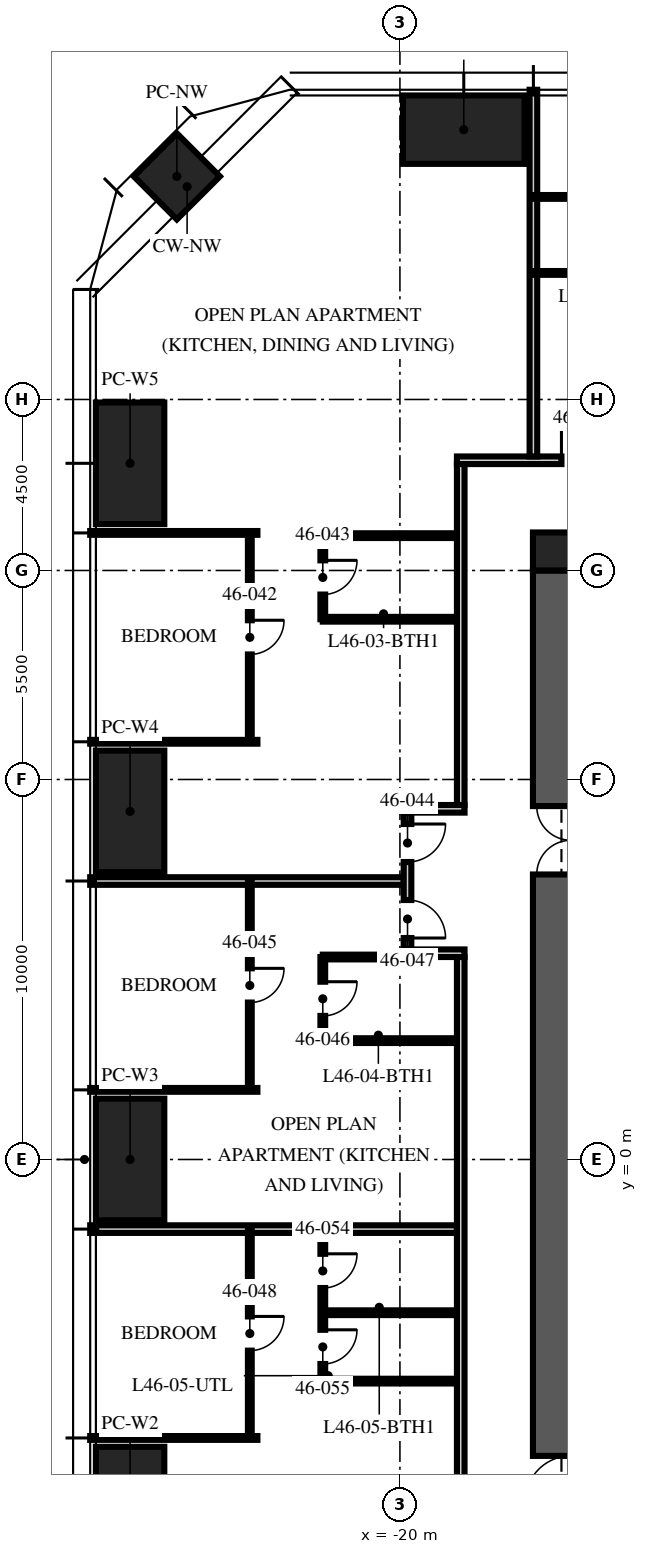
"""IFC4 building model, lengths in metres.
Left out: names, types, materials, properties, quantities, classifications, styles, units other than length and angle.
Written with IfcOpenShell. Run it as: python <this file> out.ifc"""

import sys

from ifc_helpers import new_model, si_unit, direction, frame, frame_2d, origin, origin_2d, place, context, subcontext, project, spatial, rectangle, hollow_rectangle, extrude, element, fill, save


model = new_model("IFC4")
c1 = context("Model", 3, precision=1e-05, world=origin(), true_north=direction((0.0, 1.0)))
c2 = subcontext(c1, "Body", "Model", "MODEL_VIEW")
j1 = project(units=[si_unit("LENGTHUNIT", "METRE"), si_unit("PLANEANGLEUNIT", "RADIAN")], contexts=[c1])
p1 = place(None, origin())
s1 = spatial("IfcSite", under=j1, at=p1, CompositionType="ELEMENT")
p2 = place(p1, origin())
s2 = spatial("IfcBuilding", under=s1, at=p2, CompositionType="ELEMENT")
p3 = place(p2, frame((0.0, 0.0, 182.25)))
s3 = spatial("IfcBuildingStorey", under=s2, at=p3, CompositionType="ELEMENT", Elevation=182.25)
p4 = place(p3, frame((-15.5, -15.5, -0.25), z_axis=(0.0, 0.0, 1.0), x_axis=(0.0, 1.0, 0.0)))
e1 = element("IfcWall", 1, at=p4, inside=s3, PredefinedType="SHEAR", context=c2, shape_type="SweptSolid", body=[
    extrude(rectangle(XDim=31.0, YDim=2.0, at=frame_2d((15.5, 0.0))), origin(), (0.0, 0.0, 1.0), 3.7),
])
p5 = place(p4, frame((6.5, 0.0, 0.25)))
e2 = element("IfcOpeningElement", 2, at=p5, cuts=e1, PredefinedType="OPENING", context=c2, shape_type="SweptSolid", body=[
    extrude(rectangle(XDim=1.2, YDim=2.1, at=frame_2d((0.6, 1.05))), frame((0.0, 1.01, 0.0), z_axis=(0.0, -1.0, 0.0), x_axis=(1.0, 0.0, 0.0)), (0.0, 0.0, 1.0), 2.02),
])
p6 = place(p4, frame((23.0, 0.0, 0.25)))
e3 = element("IfcOpeningElement", 3, at=p6, cuts=e1, PredefinedType="OPENING", context=c2, shape_type="SweptSolid", body=[
    extrude(rectangle(XDim=1.8, YDim=2.1, at=frame_2d((0.9, 1.05))), frame((0.0, 1.01, 0.0), z_axis=(0.0, -1.0, 0.0), x_axis=(1.0, 0.0, 0.0)), (0.0, 0.0, 1.0), 2.02),
])
p7 = place(p3, frame((-16.0, 16.0, -0.25), z_axis=(0.0, 0.0, 1.0), x_axis=(1.0, 0.0, 0.0)))
e4 = element("IfcColumn", 4, at=p7, inside=s3, PredefinedType="COLUMN", context=c2, shape_type="SweptSolid", body=[
    extrude(rectangle(XDim=1.0, YDim=1.0, at=origin_2d()), origin(), (0.0, 0.0, 1.0), 3.7),
])
for number, where, z_axis, x_axis in (
    (5, (-18.32, 27.1, 0.0), (0.0, 0.0, 1.0), (1.0, 0.0, 0.0)),
    (6, (-27.1, -9.16, 0.0), (0.0, 0.0, 1.0), (0.0, 1.0, 0.0)),
    (7, (-27.1, 0.0, 0.0), (0.0, 0.0, 1.0), (0.0, 1.0, 0.0)),
    (8, (-27.1, 9.16, 0.0), (0.0, 0.0, 1.0), (0.0, 1.0, 0.0)),
    (9, (-27.1, 18.32, 0.0), (0.0, 0.0, 1.0), (0.0, 1.0, 0.0)),
):
    element("IfcColumn", number, at=place(p3, frame(where, z_axis=z_axis, x_axis=x_axis)), inside=s3, PredefinedType="COLUMN", context=c2, shape_type="SweptSolid", body=[
        extrude(hollow_rectangle(XDim=3.2, YDim=1.8, WallThickness=0.2, at=origin_2d()), origin(), (0.0, 0.0, 1.0), 3.75),
    ])
p8 = place(p3, frame((-25.87, 25.87, 0.0), z_axis=(0.0, 0.0, 1.0), x_axis=(0.707106781187, 0.707106781187, 0.0)))
e10 = element("IfcColumn", 10, at=p8, inside=s3, PredefinedType="COLUMN", context=c2, shape_type="SweptSolid", body=[
    extrude(hollow_rectangle(XDim=1.6, YDim=1.6, WallThickness=0.1, at=origin_2d()), origin(), (0.0, 0.0, 1.0), 3.75),
])
p9 = place(p3, frame((-18.5, 18.4, 0.0), z_axis=(0.0, 0.0, 1.0), x_axis=(1.0, 0.0, 0.0)))
e11 = element("IfcWall", 11, at=p9, inside=s3, PredefinedType="PARTITIONING", context=c2, shape_type="SweptSolid", body=[
    extrude(rectangle(XDim=10.1, YDim=0.2, at=frame_2d((5.05, 0.0))), origin(), (0.0, 0.0, 1.0), 2.25),
])
p10 = place(p9, frame((2.75, 0.0, 0.0)))
e12 = element("IfcOpeningElement", 12, at=p10, cuts=e11, PredefinedType="OPENING", context=c2, shape_type="SweptSolid", body=[
    extrude(rectangle(XDim=1.0, YDim=2.2, at=frame_2d((0.5, 1.1))), frame((0.0, 0.11, 0.0), z_axis=(0.0, -1.0, 0.0), x_axis=(1.0, 0.0, 0.0)), (0.0, 0.0, 1.0), 0.22),
])
p11 = place(p3, frame((-16.488, 18.5, 0.0), z_axis=(0.0, 0.0, 1.0), x_axis=(0.0, 1.0, 0.0)))
e13 = element("IfcWall", 13, at=p11, inside=s3, PredefinedType="PARTITIONING", context=c2, shape_type="SweptSolid", body=[
    extrude(rectangle(XDim=9.65, YDim=0.2, at=frame_2d((4.825, 0.0))), origin(), (0.0, 0.0, 1.0), 2.56),
])
for number, where, z_axis, x_axis in (
    (14, (-23.75, 16.488, 0.0), (0.0, 0.0, 1.0), (-1.0, 0.0, 0.0)),
    (15, (-23.75, 10.992, 0.0), (0.0, 0.0, 1.0), (-1.0, 0.0, 0.0)),
):
    element("IfcWall", number, at=place(p3, frame(where, z_axis=z_axis, x_axis=x_axis)), inside=s3, PredefinedType="PARTITIONING", context=c2, shape_type="SweptSolid", body=[
        extrude(rectangle(XDim=4.4, YDim=0.1, at=frame_2d((2.2, 0.0))), origin(), (0.0, 0.0, 1.0), 2.56),
    ])
p12 = place(p3, frame((-19.9, 7.328, 0.0), z_axis=(0.0, 0.0, 1.0), x_axis=(-1.0, 0.0, 0.0)))
e16 = element("IfcWall", 16, at=p12, inside=s3, PredefinedType="PARTITIONING", context=c2, shape_type="SweptSolid", body=[
    extrude(rectangle(XDim=8.25, YDim=0.2, at=frame_2d((4.125, 0.0))), origin(), (0.0, 0.0, 1.0), 2.56),
])
p13 = place(p3, frame((-23.75, 1.832, 0.0), z_axis=(0.0, 0.0, 1.0), x_axis=(-1.0, 0.0, 0.0)))
e17 = element("IfcWall", 17, at=p13, inside=s3, PredefinedType="PARTITIONING", context=c2, shape_type="SweptSolid", body=[
    extrude(rectangle(XDim=4.4, YDim=0.1, at=frame_2d((2.2, 0.0))), origin(), (0.0, 0.0, 1.0), 2.56),
])
p14 = place(p3, frame((-18.5, -1.832, 0.0), z_axis=(0.0, 0.0, 1.0), x_axis=(-1.0, 0.0, 0.0)))
e18 = element("IfcWall", 18, at=p14, inside=s3, PredefinedType="PARTITIONING", context=c2, shape_type="SweptSolid", body=[
    extrude(rectangle(XDim=9.65, YDim=0.2, at=frame_2d((4.825, 0.0))), origin(), (0.0, 0.0, 1.0), 2.56),
])
p15 = place(p3, frame((-23.75, -7.328, 0.0), z_axis=(0.0, 0.0, 1.0), x_axis=(-1.0, 0.0, 0.0)))
e19 = element("IfcWall", 19, at=p15, inside=s3, PredefinedType="PARTITIONING", context=c2, shape_type="SweptSolid", body=[
    extrude(rectangle(XDim=4.4, YDim=0.1, at=frame_2d((2.2, 0.0))), origin(), (0.0, 0.0, 1.0), 2.56),
])
p16 = place(p3, frame((-10.992, 25.33, 0.0), z_axis=(0.0, 0.0, 1.0), x_axis=(-1.0, 0.0, 0.0)))
e20 = element("IfcWall", 20, at=p16, inside=s3, PredefinedType="PARTITIONING", context=c2, shape_type="SweptSolid", body=[
    extrude(rectangle(XDim=5.496, YDim=0.1, at=frame_2d((2.748, 0.0))), origin(), (0.0, 0.0, 1.0), 2.56),
])
p17 = place(p16, frame((0.15, 0.0, 0.0)))
e21 = element("IfcOpeningElement", 21, at=p17, cuts=e20, PredefinedType="OPENING", context=c2, shape_type="SweptSolid", body=[
    extrude(rectangle(XDim=0.9, YDim=2.1, at=frame_2d((0.45, 1.05))), frame((0.0, 0.06, 0.0), z_axis=(0.0, -1.0, 0.0), x_axis=(1.0, 0.0, 0.0)), (0.0, 0.0, 1.0), 0.12),
])
p18 = place(p16, frame((2.898, 0.0, 0.0)))
e22 = element("IfcOpeningElement", 22, at=p18, cuts=e20, PredefinedType="OPENING", context=c2, shape_type="SweptSolid", body=[
    extrude(rectangle(XDim=0.9, YDim=2.1, at=frame_2d((0.45, 1.05))), frame((0.0, 0.06, 0.0), z_axis=(0.0, -1.0, 0.0), x_axis=(1.0, 0.0, 0.0)), (0.0, 0.0, 1.0), 0.12),
])
p19 = place(p3, frame((-12.192, 23.33, 0.0), z_axis=(0.0, 0.0, 1.0), x_axis=(-1.0, 0.0, 0.0)))
e23 = element("IfcWall", 23, at=p19, inside=s3, PredefinedType="PARTITIONING", context=c2, shape_type="SweptSolid", body=[
    extrude(rectangle(XDim=4.296, YDim=0.1, at=frame_2d((2.148, 0.0))), origin(), (0.0, 0.0, 1.0), 2.56),
])
p20 = place(p3, frame((-23.95, 16.488, 0.0), z_axis=(0.0, 0.0, 1.0), x_axis=(0.0, -1.0, 0.0)))
e24 = element("IfcWall", 24, at=p20, inside=s3, PredefinedType="PARTITIONING", context=c2, shape_type="SweptSolid", body=[
    extrude(rectangle(XDim=5.496, YDim=0.1, at=frame_2d((2.748, 0.0))), origin(), (0.0, 0.0, 1.0), 2.56),
])
p21 = place(p20, frame((2.298, 0.0, 0.0)))
e25 = element("IfcOpeningElement", 25, at=p21, cuts=e24, PredefinedType="OPENING", context=c2, shape_type="SweptSolid", body=[
    extrude(rectangle(XDim=0.9, YDim=2.1, at=frame_2d((0.45, 1.05))), frame((0.0, 0.06, 0.0), z_axis=(0.0, -1.0, 0.0), x_axis=(1.0, 0.0, 0.0)), (0.0, 0.0, 1.0), 0.12),
])
p22 = place(p3, frame((-22.03, 16.417, 0.0), z_axis=(0.0, 0.0, 1.0), x_axis=(0.0, -1.0, 0.0)))
e26 = element("IfcWall", 26, at=p22, inside=s3, PredefinedType="PARTITIONING", context=c2, shape_type="SweptSolid", body=[
    extrude(rectangle(XDim=2.2, YDim=0.125, at=frame_2d((1.1, 0.0))), origin(), (0.0, 0.0, 1.0), 3.45),
])
p23 = place(p22, frame((0.65, 0.0, 0.0)))
e27 = element("IfcOpeningElement", 27, at=p23, cuts=e26, PredefinedType="OPENING", context=c2, shape_type="SweptSolid", body=[
    extrude(rectangle(XDim=0.9, YDim=2.1, at=frame_2d((0.45, 1.05))), frame((0.0, 0.073, 0.0), z_axis=(0.0, -1.0, 0.0), x_axis=(1.0, 0.0, 0.0)), (0.0, 0.0, 1.0), 0.145),
])
for number, where, z_axis, x_axis in (
    (28, (-18.5, 16.417, 0.0), (0.0, 0.0, 1.0), (-1.0, 0.0, 0.0)),
    (29, (-18.5, 14.217, 0.0), (0.0, 0.0, 1.0), (-1.0, 0.0, 0.0)),
):
    element("IfcWall", number, at=place(p3, frame(where, z_axis=z_axis, x_axis=x_axis)), inside=s3, PredefinedType="PARTITIONING", context=c2, shape_type="SweptSolid", body=[
        extrude(rectangle(XDim=3.53, YDim=0.125, at=frame_2d((1.765, 0.0))), origin(), (0.0, 0.0, 1.0), 3.45),
    ])
p24 = place(p3, frame((-23.95, 7.328, 0.0), z_axis=(0.0, 0.0, 1.0), x_axis=(0.0, -1.0, 0.0)))
e30 = element("IfcWall", 30, at=p24, inside=s3, PredefinedType="PARTITIONING", context=c2, shape_type="SweptSolid", body=[
    extrude(rectangle(XDim=5.496, YDim=0.1, at=frame_2d((2.748, 0.0))), origin(), (0.0, 0.0, 1.0), 2.56),
])
p25 = place(p24, frame((2.298, 0.0, 0.0)))
e31 = element("IfcOpeningElement", 31, at=p25, cuts=e30, PredefinedType="OPENING", context=c2, shape_type="SweptSolid", body=[
    extrude(rectangle(XDim=0.9, YDim=2.1, at=frame_2d((0.45, 1.05))), frame((0.0, 0.06, 0.0), z_axis=(0.0, -1.0, 0.0), x_axis=(1.0, 0.0, 0.0)), (0.0, 0.0, 1.0), 0.12),
])
p26 = place(p3, frame((-22.03, 5.328, 0.0), z_axis=(0.0, 0.0, 1.0), x_axis=(0.0, -1.0, 0.0)))
e32 = element("IfcWall", 32, at=p26, inside=s3, PredefinedType="PARTITIONING", context=c2, shape_type="SweptSolid", body=[
    extrude(rectangle(XDim=2.2, YDim=0.125, at=frame_2d((1.1, 0.0))), origin(), (0.0, 0.0, 1.0), 2.56),
])
p27 = place(p26, frame((0.65, 0.0, 0.0)))
e33 = element("IfcOpeningElement", 33, at=p27, cuts=e32, PredefinedType="OPENING", context=c2, shape_type="SweptSolid", body=[
    extrude(rectangle(XDim=0.9, YDim=2.1, at=frame_2d((0.45, 1.05))), frame((0.0, 0.073, 0.0), z_axis=(0.0, -1.0, 0.0), x_axis=(1.0, 0.0, 0.0)), (0.0, 0.0, 1.0), 0.145),
])
p28 = place(p3, frame((-19.97, 5.328, 0.0), z_axis=(0.0, 0.0, 1.0), x_axis=(-1.0, 0.0, 0.0)))
e34 = element("IfcWall", 34, at=p28, inside=s3, PredefinedType="PARTITIONING", context=c2, shape_type="SweptSolid", body=[
    extrude(rectangle(XDim=2.06, YDim=0.125, at=frame_2d((1.03, 0.0))), origin(), (0.0, 0.0, 1.0), 3.45),
])
p29 = place(p3, frame((-18.5, 3.128, 0.0), z_axis=(0.0, 0.0, 1.0), x_axis=(-1.0, 0.0, 0.0)))
e35 = element("IfcWall", 35, at=p29, inside=s3, PredefinedType="PARTITIONING", context=c2, shape_type="SweptSolid", body=[
    extrude(rectangle(XDim=3.53, YDim=0.125, at=frame_2d((1.765, 0.0))), origin(), (0.0, 0.0, 1.0), 3.45),
])
p30 = place(p3, frame((-23.95, -1.832, 0.0), z_axis=(0.0, 0.0, 1.0), x_axis=(0.0, -1.0, 0.0)))
e36 = element("IfcWall", 36, at=p30, inside=s3, PredefinedType="PARTITIONING", context=c2, shape_type="SweptSolid", body=[
    extrude(rectangle(XDim=5.496, YDim=0.1, at=frame_2d((2.748, 0.0))), origin(), (0.0, 0.0, 1.0), 2.56),
])
p31 = place(p30, frame((2.298, 0.0, 0.0)))
e37 = element("IfcOpeningElement", 37, at=p31, cuts=e36, PredefinedType="OPENING", context=c2, shape_type="SweptSolid", body=[
    extrude(rectangle(XDim=0.9, YDim=2.1, at=frame_2d((0.45, 1.05))), frame((0.0, 0.06, 0.0), z_axis=(0.0, -1.0, 0.0), x_axis=(1.0, 0.0, 0.0)), (0.0, 0.0, 1.0), 0.12),
])
p32 = place(p3, frame((-22.03, -1.832, 0.0), z_axis=(0.0, 0.0, 1.0), x_axis=(0.0, -1.0, 0.0)))
e38 = element("IfcWall", 38, at=p32, inside=s3, PredefinedType="PARTITIONING", context=c2, shape_type="SweptSolid", body=[
    extrude(rectangle(XDim=4.0, YDim=0.125, at=frame_2d((2.0, 0.0))), origin(), (0.0, 0.0, 1.0), 2.56),
])
p33 = place(p32, frame((0.65, 0.0, 0.0)))
e39 = element("IfcOpeningElement", 39, at=p33, cuts=e38, PredefinedType="OPENING", context=c2, shape_type="SweptSolid", body=[
    extrude(rectangle(XDim=0.9, YDim=2.1, at=frame_2d((0.45, 1.05))), frame((0.0, 0.073, 0.0), z_axis=(0.0, -1.0, 0.0), x_axis=(1.0, 0.0, 0.0)), (0.0, 0.0, 1.0), 0.145),
])
p34 = place(p32, frame((2.65, 0.0, 0.0)))
e40 = element("IfcOpeningElement", 40, at=p34, cuts=e38, PredefinedType="OPENING", context=c2, shape_type="SweptSolid", body=[
    extrude(rectangle(XDim=0.9, YDim=2.1, at=frame_2d((0.45, 1.05))), frame((0.0, 0.073, 0.0), z_axis=(0.0, -1.0, 0.0), x_axis=(1.0, 0.0, 0.0)), (0.0, 0.0, 1.0), 0.145),
])
for number, where, z_axis, x_axis in (
    (41, (-18.5, -4.032, 0.0), (0.0, 0.0, 1.0), (-1.0, 0.0, 0.0)),
    (42, (-18.5, -5.832, 0.0), (0.0, 0.0, 1.0), (-1.0, 0.0, 0.0)),
):
    element("IfcWall", number, at=place(p3, frame(where, z_axis=z_axis, x_axis=x_axis)), inside=s3, PredefinedType="PARTITIONING", context=c2, shape_type="SweptSolid", body=[
        extrude(rectangle(XDim=3.53, YDim=0.125, at=frame_2d((1.765, 0.0))), origin(), (0.0, 0.0, 1.0), 3.45),
    ])
p35 = place(p3, frame((-18.4, 18.3, 0.0), z_axis=(0.0, 0.0, 1.0), x_axis=(0.0, -1.0, 0.0)))
e43 = element("IfcWall", 43, at=p35, inside=s3, PredefinedType="PARTITIONING", context=c2, shape_type="SweptSolid", body=[
    extrude(rectangle(XDim=8.972, YDim=0.2, at=frame_2d((4.486, 0.0))), origin(), (0.0, 0.0, 1.0), 2.25),
])
p36 = place(p3, frame((-18.3, 9.228, 0.0), z_axis=(0.0, 0.0, 1.0), x_axis=(-1.0, 0.0, 0.0)))
e44 = element("IfcWall", 44, at=p36, inside=s3, PredefinedType="PARTITIONING", context=c2, shape_type="SweptSolid", body=[
    extrude(rectangle(XDim=1.6, YDim=0.2, at=frame_2d((0.8, 0.0))), origin(), (0.0, 0.0, 1.0), 2.45),
])
p37 = place(p3, frame((-18.3, 5.428, 0.0), z_axis=(0.0, 0.0, 1.0), x_axis=(-1.0, 0.0, 0.0)))
e45 = element("IfcWall", 45, at=p37, inside=s3, PredefinedType="PARTITIONING", context=c2, shape_type="SweptSolid", body=[
    extrude(rectangle(XDim=1.6, YDim=0.2, at=frame_2d((0.8, 0.0))), origin(), (0.0, 0.0, 1.0), 3.45),
])
p38 = place(p3, frame((-19.8, 9.128, 0.0), z_axis=(0.0, 0.0, 1.0), x_axis=(0.0, -1.0, 0.0)))
e46 = element("IfcWall", 46, at=p38, inside=s3, PredefinedType="PARTITIONING", context=c2, shape_type="SweptSolid", body=[
    extrude(rectangle(XDim=3.6, YDim=0.2, at=frame_2d((1.8, 0.0))), origin(), (0.0, 0.0, 1.0), 2.45),
])
p39 = place(p38, frame((0.3, 0.0, 0.0)))
e47 = element("IfcOpeningElement", 47, at=p39, cuts=e46, PredefinedType="OPENING", context=c2, shape_type="SweptSolid", body=[
    extrude(rectangle(XDim=1.0, YDim=2.2, at=frame_2d((0.5, 1.1))), frame((0.0, 0.11, 0.0), z_axis=(0.0, -1.0, 0.0), x_axis=(1.0, 0.0, 0.0)), (0.0, 0.0, 1.0), 0.22),
])
p40 = place(p38, frame((2.3, 0.0, 0.0)))
e48 = element("IfcOpeningElement", 48, at=p40, cuts=e46, PredefinedType="OPENING", context=c2, shape_type="SweptSolid", body=[
    extrude(rectangle(XDim=1.0, YDim=2.2, at=frame_2d((0.5, 1.1))), frame((0.0, 0.11, 0.0), z_axis=(0.0, -1.0, 0.0), x_axis=(1.0, 0.0, 0.0)), (0.0, 0.0, 1.0), 0.22),
])
p41 = place(p3, frame((-18.4, 5.328, 0.0), z_axis=(0.0, 0.0, 1.0), x_axis=(0.0, -1.0, 0.0)))
e49 = element("IfcWall", 49, at=p41, inside=s3, PredefinedType="PARTITIONING", context=c2, shape_type="SweptSolid", body=[
    extrude(rectangle(XDim=23.628, YDim=0.2, at=frame_2d((11.814, 0.0))), origin(), (0.0, 0.0, 1.0), 2.25),
])
p42 = place(p41, frame((21.68, 0.0, 0.0)))
e50 = element("IfcOpeningElement", 50, at=p42, cuts=e49, PredefinedType="OPENING", context=c2, shape_type="SweptSolid", body=[
    extrude(rectangle(XDim=1.0, YDim=2.2, at=frame_2d((0.5, 1.1))), frame((0.0, 0.11, 0.0), z_axis=(0.0, -1.0, 0.0), x_axis=(1.0, 0.0, 0.0)), (0.0, 0.0, 1.0), 0.22),
])
p43 = place(p10, origin())
e51 = element("IfcDoor", 51, at=p43, inside=s3, OperationType="SINGLE_SWING_LEFT", PredefinedType="DOOR", context=c2, shape_type="SweptSolid", body=[
    extrude(rectangle(XDim=1.0, YDim=2.2, at=frame_2d((0.5, 1.1))), frame((0.0, 0.025, 0.0), z_axis=(0.0, -1.0, 0.0), x_axis=(1.0, 0.0, 0.0)), (0.0, 0.0, 1.0), 0.05),
])
fill(e12, e51)
p44 = place(p21, origin())
e52 = element("IfcDoor", 52, at=p44, inside=s3, OperationType="SINGLE_SWING_LEFT", PredefinedType="DOOR", context=c2, shape_type="SweptSolid", body=[
    extrude(rectangle(XDim=0.9, YDim=2.1, at=frame_2d((0.45, 1.05))), frame((0.0, 0.025, 0.0), z_axis=(0.0, -1.0, 0.0), x_axis=(1.0, 0.0, 0.0)), (0.0, 0.0, 1.0), 0.05),
])
fill(e25, e52)
p45 = place(p23, origin())
e53 = element("IfcDoor", 53, at=p45, inside=s3, OperationType="SINGLE_SWING_LEFT", PredefinedType="DOOR", context=c2, shape_type="SweptSolid", body=[
    extrude(rectangle(XDim=0.9, YDim=2.1, at=frame_2d((0.45, 1.05))), frame((0.0, 0.025, 0.0), z_axis=(0.0, -1.0, 0.0), x_axis=(1.0, 0.0, 0.0)), (0.0, 0.0, 1.0), 0.05),
])
fill(e27, e53)
p46 = place(p39, origin())
e54 = element("IfcDoor", 54, at=p46, inside=s3, OperationType="SINGLE_SWING_LEFT", PredefinedType="DOOR", context=c2, shape_type="SweptSolid", body=[
    extrude(rectangle(XDim=1.0, YDim=2.2, at=frame_2d((0.5, 1.1))), frame((0.0, 0.025, 0.0), z_axis=(0.0, -1.0, 0.0), x_axis=(1.0, 0.0, 0.0)), (0.0, 0.0, 1.0), 0.05),
])
fill(e47, e54)
p47 = place(p25, origin())
e55 = element("IfcDoor", 55, at=p47, inside=s3, OperationType="SINGLE_SWING_LEFT", PredefinedType="DOOR", context=c2, shape_type="SweptSolid", body=[
    extrude(rectangle(XDim=0.9, YDim=2.1, at=frame_2d((0.45, 1.05))), frame((0.0, 0.025, 0.0), z_axis=(0.0, -1.0, 0.0), x_axis=(1.0, 0.0, 0.0)), (0.0, 0.0, 1.0), 0.05),
])
fill(e31, e55)
p48 = place(p27, origin())
e56 = element("IfcDoor", 56, at=p48, inside=s3, OperationType="SINGLE_SWING_LEFT", PredefinedType="DOOR", context=c2, shape_type="SweptSolid", body=[
    extrude(rectangle(XDim=0.9, YDim=2.1, at=frame_2d((0.45, 1.05))), frame((0.0, 0.025, 0.0), z_axis=(0.0, -1.0, 0.0), x_axis=(1.0, 0.0, 0.0)), (0.0, 0.0, 1.0), 0.05),
])
fill(e33, e56)
p49 = place(p40, origin())
e57 = element("IfcDoor", 57, at=p49, inside=s3, OperationType="SINGLE_SWING_RIGHT", PredefinedType="DOOR", context=c2, shape_type="SweptSolid", body=[
    extrude(rectangle(XDim=1.0, YDim=2.2, at=frame_2d((0.5, 1.1))), frame((0.0, 0.025, 0.0), z_axis=(0.0, -1.0, 0.0), x_axis=(1.0, 0.0, 0.0)), (0.0, 0.0, 1.0), 0.05),
])
fill(e48, e57)
p50 = place(p31, origin())
e58 = element("IfcDoor", 58, at=p50, inside=s3, OperationType="SINGLE_SWING_LEFT", PredefinedType="DOOR", context=c2, shape_type="SweptSolid", body=[
    extrude(rectangle(XDim=0.9, YDim=2.1, at=frame_2d((0.45, 1.05))), frame((0.0, 0.025, 0.0), z_axis=(0.0, -1.0, 0.0), x_axis=(1.0, 0.0, 0.0)), (0.0, 0.0, 1.0), 0.05),
])
fill(e37, e58)
p51 = place(p33, origin())
e59 = element("IfcDoor", 59, at=p51, inside=s3, OperationType="SINGLE_SWING_LEFT", PredefinedType="DOOR", context=c2, shape_type="SweptSolid", body=[
    extrude(rectangle(XDim=0.9, YDim=2.1, at=frame_2d((0.45, 1.05))), frame((0.0, 0.025, 0.0), z_axis=(0.0, -1.0, 0.0), x_axis=(1.0, 0.0, 0.0)), (0.0, 0.0, 1.0), 0.05),
])
fill(e39, e59)
p52 = place(p34, origin())
e60 = element("IfcDoor", 60, at=p52, inside=s3, OperationType="SINGLE_SWING_LEFT", PredefinedType="DOOR", context=c2, shape_type="SweptSolid", body=[
    extrude(rectangle(XDim=0.9, YDim=2.1, at=frame_2d((0.45, 1.05))), frame((0.0, 0.025, 0.0), z_axis=(0.0, -1.0, 0.0), x_axis=(1.0, 0.0, 0.0)), (0.0, 0.0, 1.0), 0.05),
])
fill(e40, e60)
save(model, sys.argv[1])
